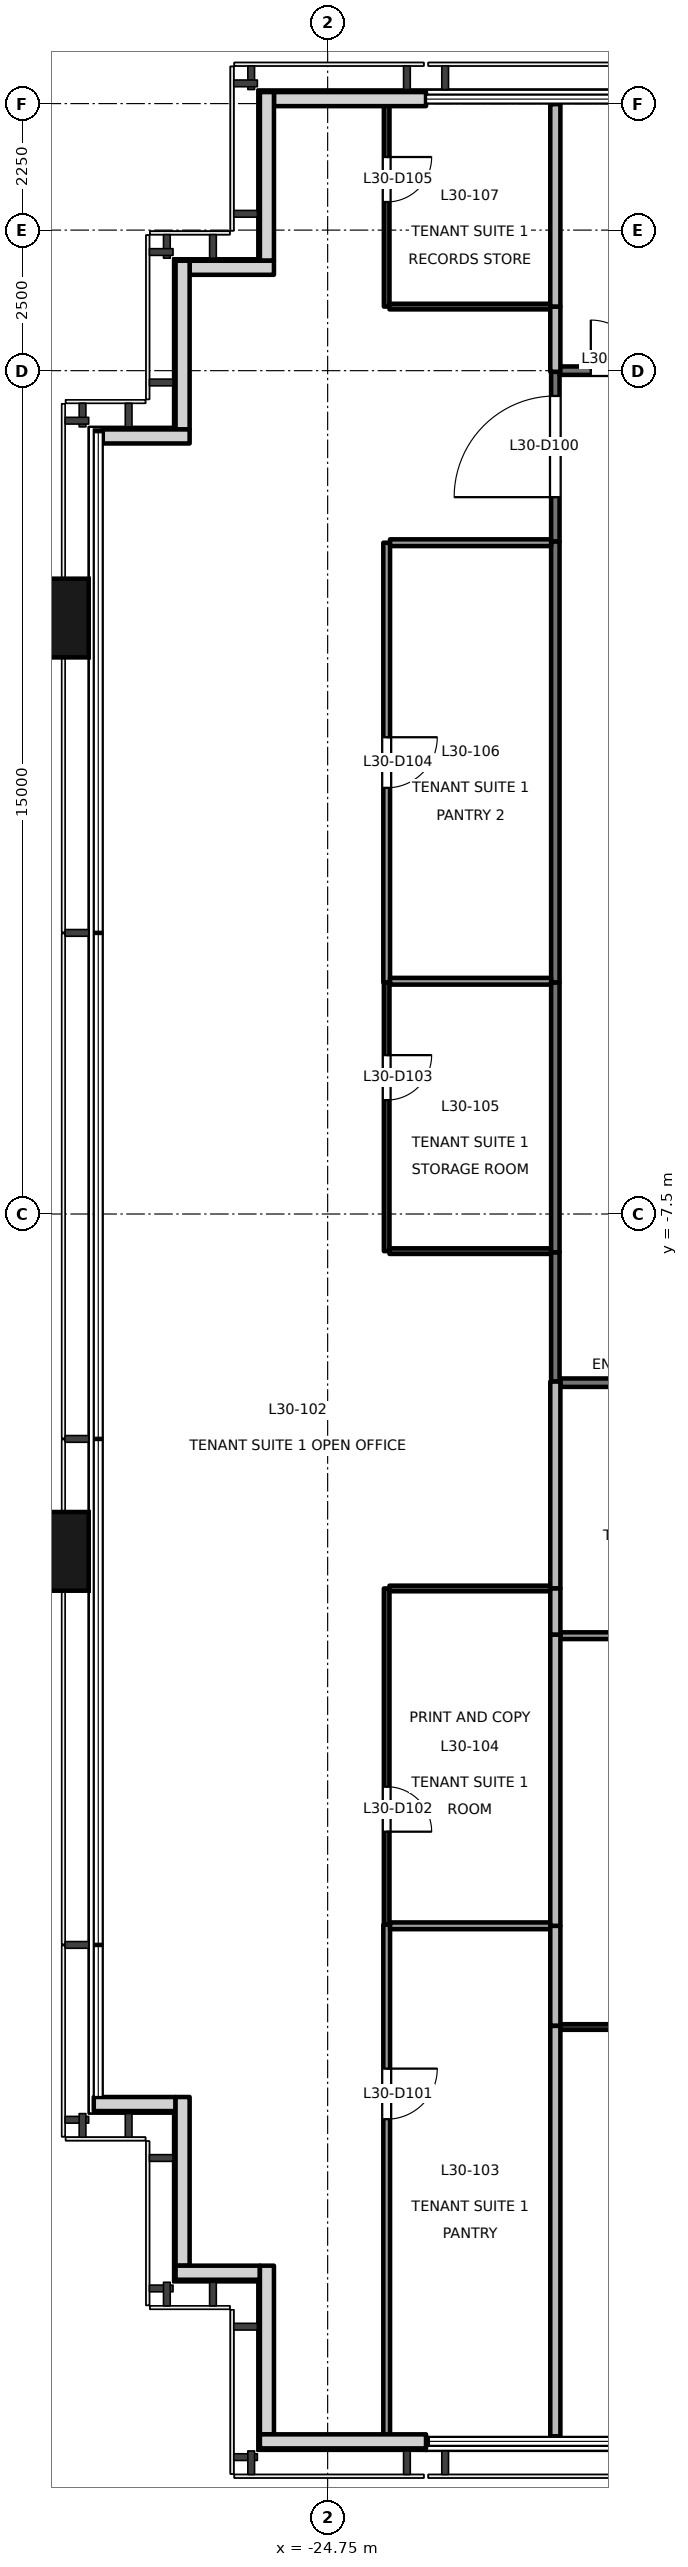
"""IFC4 building model, lengths in metres.
Left out: names, types, materials, properties, quantities, classifications, styles, units other than length and angle.
Written with IfcOpenShell. Run it as: python <this file> out.ifc"""

import sys

from ifc_helpers import new_model, si_unit, direction, frame, frame_2d, origin, origin_2d, place, context, subcontext, project, spatial, rectangle, extrude, element, fill, save


model = new_model("IFC4")
c1 = context("Model", 3, precision=1e-05, world=origin(), true_north=direction((0.0, 1.0)))
c2 = subcontext(c1, "Body", "Model", "MODEL_VIEW")
j1 = project(units=[si_unit("LENGTHUNIT", "METRE"), si_unit("PLANEANGLEUNIT", "RADIAN")], contexts=[c1])
p1 = place(None, origin())
s1 = spatial("IfcSite", under=j1, at=p1, CompositionType="ELEMENT")
p2 = place(p1, origin())
s2 = spatial("IfcBuilding", under=s1, at=p2, CompositionType="ELEMENT")
p3 = place(p2, frame((0.0, 0.0, 134.1)))
s3 = spatial("IfcBuildingStorey", under=s2, at=p3, CompositionType="ELEMENT", Elevation=134.1)
for number, where, z_axis, x_axis in (
    (1, (-29.9, -13.5, -0.2), (0.0, 0.0, 1.0), (0.0, 1.0, 0.0)),
    (2, (-29.9, 3.1, -0.2), (0.0, 0.0, 1.0), (0.0, 1.0, 0.0)),
):
    element("IfcColumn", number, at=place(p3, frame(where, z_axis=z_axis, x_axis=x_axis)), inside=s3, PredefinedType="COLUMN", context=c2, shape_type="SweptSolid", body=[
        extrude(rectangle(XDim=1.4, YDim=1.8, at=origin_2d()), origin(), (0.0, 0.0, 1.0), 4.0),
    ])
p4 = place(p3, frame((-23.0, 12.33, 0.0), z_axis=(0.0, 0.0, 1.0), x_axis=(-1.0, 0.0, 0.0)))
e3 = element("IfcWall", 3, at=p4, inside=s3, PredefinedType="SOLIDWALL", context=c2, shape_type="SweptSolid", body=[
    extrude(rectangle(XDim=2.705, YDim=0.25, at=frame_2d((1.353, 0.0))), origin(), (0.0, 0.0, 1.0), 3.8),
])
p5 = place(p3, frame((-25.83, 12.455, 0.0), z_axis=(0.0, 0.0, 1.0), x_axis=(0.0, -1.0, 0.0)))
e4 = element("IfcWall", 4, at=p5, inside=s3, PredefinedType="SOLIDWALL", context=c2, shape_type="SweptSolid", body=[
    extrude(rectangle(XDim=3.0, YDim=0.25, at=frame_2d((1.5, 0.0))), origin(), (0.0, 0.0, 1.0), 3.8),
])
p6 = place(p3, frame((-25.705, 9.33, 0.0), z_axis=(0.0, 0.0, 1.0), x_axis=(-1.0, 0.0, 0.0)))
e5 = element("IfcWall", 5, at=p6, inside=s3, PredefinedType="SOLIDWALL", context=c2, shape_type="SweptSolid", body=[
    extrude(rectangle(XDim=1.5, YDim=0.25, at=frame_2d((0.75, 0.0))), origin(), (0.0, 0.0, 1.0), 3.8),
])
p7 = place(p3, frame((-27.33, 9.455, 0.0), z_axis=(0.0, 0.0, 1.0), x_axis=(0.0, -1.0, 0.0)))
e6 = element("IfcWall", 6, at=p7, inside=s3, PredefinedType="SOLIDWALL", context=c2, shape_type="SweptSolid", body=[
    extrude(rectangle(XDim=3.0, YDim=0.25, at=frame_2d((1.5, 0.0))), origin(), (0.0, 0.0, 1.0), 3.8),
])
p8 = place(p3, frame((-27.205, 6.33, 0.0), z_axis=(0.0, 0.0, 1.0), x_axis=(-1.0, 0.0, 0.0)))
e7 = element("IfcWall", 7, at=p8, inside=s3, PredefinedType="SOLIDWALL", context=c2, shape_type="SweptSolid", body=[
    extrude(rectangle(XDim=1.545, YDim=0.25, at=frame_2d((0.772, 0.0))), origin(), (0.0, 0.0, 1.0), 3.8),
])
p9 = place(p3, frame((-28.91, -23.33, 0.0), z_axis=(0.0, 0.0, 1.0), x_axis=(1.0, 0.0, 0.0)))
e8 = element("IfcWall", 8, at=p9, inside=s3, PredefinedType="SOLIDWALL", context=c2, shape_type="SweptSolid", body=[
    extrude(rectangle(XDim=1.455, YDim=0.25, at=frame_2d((0.728, 0.0))), origin(), (0.0, 0.0, 1.0), 3.8),
])
p10 = place(p3, frame((-27.33, -23.205, 0.0), z_axis=(0.0, 0.0, 1.0), x_axis=(0.0, -1.0, 0.0)))
e9 = element("IfcWall", 9, at=p10, inside=s3, PredefinedType="SOLIDWALL", context=c2, shape_type="SweptSolid", body=[
    extrude(rectangle(XDim=3.0, YDim=0.25, at=frame_2d((1.5, 0.0))), origin(), (0.0, 0.0, 1.0), 3.8),
])
p11 = place(p3, frame((-27.455, -26.33, 0.0), z_axis=(0.0, 0.0, 1.0), x_axis=(1.0, 0.0, 0.0)))
e10 = element("IfcWall", 10, at=p11, inside=s3, PredefinedType="SOLIDWALL", context=c2, shape_type="SweptSolid", body=[
    extrude(rectangle(XDim=1.5, YDim=0.25, at=frame_2d((0.75, 0.0))), origin(), (0.0, 0.0, 1.0), 3.8),
])
p12 = place(p3, frame((-25.83, -26.205, 0.0), z_axis=(0.0, 0.0, 1.0), x_axis=(0.0, -1.0, 0.0)))
e11 = element("IfcWall", 11, at=p12, inside=s3, PredefinedType="SOLIDWALL", context=c2, shape_type="SweptSolid", body=[
    extrude(rectangle(XDim=3.0, YDim=0.25, at=frame_2d((1.5, 0.0))), origin(), (0.0, 0.0, 1.0), 3.8),
])
p13 = place(p3, frame((-25.955, -29.33, 0.0), z_axis=(0.0, 0.0, 1.0), x_axis=(1.0, 0.0, 0.0)))
e12 = element("IfcWall", 12, at=p13, inside=s3, PredefinedType="SOLIDWALL", context=c2, shape_type="SweptSolid", body=[
    extrude(rectangle(XDim=2.955, YDim=0.25, at=frame_2d((1.478, 0.0))), origin(), (0.0, 0.0, 1.0), 3.8),
])
p14 = place(p3, frame((-20.7, -10.48, 0.0), z_axis=(0.0, 0.0, 1.0), x_axis=(0.0, 1.0, 0.0)))
e13 = element("IfcWall", 13, at=p14, inside=s3, PredefinedType="PARTITIONING", context=c2, shape_type="SweptSolid", body=[
    extrude(rectangle(XDim=2.3, YDim=0.15, at=frame_2d((1.15, 0.0))), origin(), (0.0, 0.0, 1.0), 3.8),
])
p15 = place(p3, frame((-20.7, 4.46, 0.0), z_axis=(0.0, 0.0, 1.0), x_axis=(0.0, 1.0, 0.0)))
e14 = element("IfcWall", 14, at=p15, inside=s3, PredefinedType="PARTITIONING", context=c2, shape_type="SweptSolid", body=[
    extrude(rectangle(XDim=3.02, YDim=0.15, at=frame_2d((1.51, 0.0))), origin(), (0.0, 0.0, 1.0), 3.3),
])
p16 = place(p15, frame((0.79, 0.0, 0.0)))
e15 = element("IfcOpeningElement", 15, at=p16, cuts=e14, PredefinedType="OPENING", context=c2, shape_type="SweptSolid", body=[
    extrude(rectangle(XDim=1.8, YDim=2.1, at=frame_2d((0.9, 1.05))), frame((0.0, 0.085, 0.0), z_axis=(0.0, -1.0, 0.0), x_axis=(1.0, 0.0, 0.0)), (0.0, 0.0, 1.0), 0.171),
])
p17 = place(p3, frame((-20.7, -8.18, 0.0), z_axis=(0.0, 0.0, 1.0), x_axis=(0.0, 1.0, 0.0)))
e16 = element("IfcWall", 16, at=p17, inside=s3, PredefinedType="PARTITIONING", context=c2, shape_type="SweptSolid", body=[
    extrude(rectangle(XDim=4.8, YDim=0.15, at=frame_2d((2.4, 0.0))), origin(), (0.0, 0.0, 1.0), 3.3),
])
p18 = place(p3, frame((-20.7, -3.38, 0.0), z_axis=(0.0, 0.0, 1.0), x_axis=(0.0, 1.0, 0.0)))
e17 = element("IfcWall", 17, at=p18, inside=s3, PredefinedType="PARTITIONING", context=c2, shape_type="SweptSolid", body=[
    extrude(rectangle(XDim=7.84, YDim=0.15, at=frame_2d((3.92, 0.0))), origin(), (0.0, 0.0, 1.0), 3.3),
])
p19 = place(p3, frame((-15.92, -10.5, 0.0), z_axis=(0.0, 0.0, 1.0), x_axis=(-1.0, 0.0, 0.0)))
e18 = element("IfcWall", 18, at=p19, inside=s3, PredefinedType="PARTITIONING", context=c2, shape_type="SweptSolid", body=[
    extrude(rectangle(XDim=4.69, YDim=0.15, at=frame_2d((2.345, 0.0))), origin(), (0.0, 0.0, 1.0), 3.8),
])
p20 = place(p3, frame((-20.625, 7.5, 0.0), z_axis=(0.0, 0.0, 1.0), x_axis=(1.0, 0.0, 0.0)))
e19 = element("IfcWall", 19, at=p20, inside=s3, PredefinedType="PARTITIONING", context=c2, shape_type="SweptSolid", body=[
    extrude(rectangle(XDim=2.625, YDim=0.15, at=frame_2d((1.312, 0.0))), origin(), (0.0, 0.0, 1.0), 3.8),
])
p21 = place(p20, frame((0.556, 0.0, 0.0)))
e20 = element("IfcOpeningElement", 20, at=p21, cuts=e19, PredefinedType="OPENING", context=c2, shape_type="SweptSolid", body=[
    extrude(rectangle(XDim=0.9, YDim=2.1, at=frame_2d((0.45, 1.05))), frame((0.0, 0.085, 0.0), z_axis=(0.0, -1.0, 0.0), x_axis=(1.0, 0.0, 0.0)), (0.0, 0.0, 1.0), 0.171),
])
p22 = place(p3, frame((-23.7, -20.14, 0.0), z_axis=(0.0, 0.0, 1.0), x_axis=(0.0, -1.0, 0.0)))
e21 = element("IfcWall", 21, at=p22, inside=s3, PredefinedType="PARTITIONING", context=c2, shape_type="SweptSolid", body=[
    extrude(rectangle(XDim=9.1, YDim=0.12, at=frame_2d((4.55, 0.0))), origin(), (0.0, 0.0, 1.0), 3.8),
])
p23 = place(p22, frame((2.56, 0.0, 0.0)))
e22 = element("IfcOpeningElement", 22, at=p23, cuts=e21, PredefinedType="OPENING", context=c2, shape_type="SweptSolid", body=[
    extrude(rectangle(XDim=0.9, YDim=2.1, at=frame_2d((0.45, 1.05))), frame((0.0, 0.071, 0.0), z_axis=(0.0, -1.0, 0.0), x_axis=(1.0, 0.0, 0.0)), (0.0, 0.0, 1.0), 0.141),
])
p24 = place(p3, frame((-23.7, -14.16, 0.0), z_axis=(0.0, 0.0, 1.0), x_axis=(0.0, -1.0, 0.0)))
e23 = element("IfcWall", 23, at=p24, inside=s3, PredefinedType="PARTITIONING", context=c2, shape_type="SweptSolid", body=[
    extrude(rectangle(XDim=5.98, YDim=0.1, at=frame_2d((2.99, 0.0))), origin(), (0.0, 0.0, 1.0), 3.8),
])
p25 = place(p24, frame((3.526, 0.0, 0.0)))
e24 = element("IfcOpeningElement", 24, at=p25, cuts=e23, PredefinedType="OPENING", context=c2, shape_type="SweptSolid", body=[
    extrude(rectangle(XDim=0.8, YDim=2.1, at=frame_2d((0.4, 1.05))), frame((0.0, 0.061, 0.0), z_axis=(0.0, -1.0, 0.0), x_axis=(1.0, 0.0, 0.0)), (0.0, 0.0, 1.0), 0.121),
])
p26 = place(p3, frame((-20.79, -14.16, 0.0), z_axis=(0.0, 0.0, 1.0), x_axis=(-1.0, 0.0, 0.0)))
e25 = element("IfcWall", 25, at=p26, inside=s3, PredefinedType="PARTITIONING", context=c2, shape_type="SweptSolid", body=[
    extrude(rectangle(XDim=2.86, YDim=0.1, at=frame_2d((1.43, 0.0))), origin(), (0.0, 0.0, 1.0), 3.8),
])
p27 = place(p3, frame((-23.7, -3.38, 0.0), z_axis=(0.0, 0.0, 1.0), x_axis=(0.0, -1.0, 0.0)))
e26 = element("IfcWall", 26, at=p27, inside=s3, PredefinedType="PARTITIONING", context=c2, shape_type="SweptSolid", body=[
    extrude(rectangle(XDim=4.78, YDim=0.1, at=frame_2d((2.39, 0.0))), origin(), (0.0, 0.0, 1.0), 3.3),
])
p28 = place(p27, frame((1.294, 0.0, 0.0)))
e27 = element("IfcOpeningElement", 27, at=p28, cuts=e26, PredefinedType="OPENING", context=c2, shape_type="SweptSolid", body=[
    extrude(rectangle(XDim=0.8, YDim=2.1, at=frame_2d((0.4, 1.05))), frame((0.0, 0.061, 0.0), z_axis=(0.0, -1.0, 0.0), x_axis=(1.0, 0.0, 0.0)), (0.0, 0.0, 1.0), 0.121),
])
p29 = place(p3, frame((-23.65, -8.16, 0.0), z_axis=(0.0, 0.0, 1.0), x_axis=(1.0, 0.0, 0.0)))
e28 = element("IfcWall", 28, at=p29, inside=s3, PredefinedType="PARTITIONING", context=c2, shape_type="SweptSolid", body=[
    extrude(rectangle(XDim=2.875, YDim=0.1, at=frame_2d((1.438, 0.0))), origin(), (0.0, 0.0, 1.0), 3.8),
])
p30 = place(p3, frame((-23.7, 4.44, 0.0), z_axis=(0.0, 0.0, 1.0), x_axis=(0.0, -1.0, 0.0)))
e29 = element("IfcWall", 29, at=p30, inside=s3, PredefinedType="PARTITIONING", context=c2, shape_type="SweptSolid", body=[
    extrude(rectangle(XDim=7.82, YDim=0.12, at=frame_2d((3.91, 0.0))), origin(), (0.0, 0.0, 1.0), 3.3),
])
p31 = place(p30, frame((3.46, 0.0, 0.0)))
e30 = element("IfcOpeningElement", 30, at=p31, cuts=e29, PredefinedType="OPENING", context=c2, shape_type="SweptSolid", body=[
    extrude(rectangle(XDim=0.9, YDim=2.1, at=frame_2d((0.45, 1.05))), frame((0.0, 0.071, 0.0), z_axis=(0.0, -1.0, 0.0), x_axis=(1.0, 0.0, 0.0)), (0.0, 0.0, 1.0), 0.141),
])
p32 = place(p3, frame((-20.775, 4.44, 0.0), z_axis=(0.0, 0.0, 1.0), x_axis=(-1.0, 0.0, 0.0)))
e31 = element("IfcWall", 31, at=p32, inside=s3, PredefinedType="PARTITIONING", context=c2, shape_type="SweptSolid", body=[
    extrude(rectangle(XDim=2.865, YDim=0.12, at=frame_2d((1.433, 0.0))), origin(), (0.0, 0.0, 1.0), 3.3),
])
p33 = place(p3, frame((-23.7, 12.24, 0.0), z_axis=(0.0, 0.0, 1.0), x_axis=(0.0, -1.0, 0.0)))
e32 = element("IfcWall", 32, at=p33, inside=s3, PredefinedType="PARTITIONING", context=c2, shape_type="SweptSolid", body=[
    extrude(rectangle(XDim=3.6, YDim=0.1, at=frame_2d((1.8, 0.0))), origin(), (0.0, 0.0, 1.0), 3.8),
])
p34 = place(p33, frame((0.94, 0.0, 0.0)))
e33 = element("IfcOpeningElement", 33, at=p34, cuts=e32, PredefinedType="OPENING", context=c2, shape_type="SweptSolid", body=[
    extrude(rectangle(XDim=0.8, YDim=2.1, at=frame_2d((0.4, 1.05))), frame((0.0, 0.061, 0.0), z_axis=(0.0, -1.0, 0.0), x_axis=(1.0, 0.0, 0.0)), (0.0, 0.0, 1.0), 0.121),
])
p35 = place(p3, frame((-23.65, 8.64, 0.0), z_axis=(0.0, 0.0, 1.0), x_axis=(1.0, 0.0, 0.0)))
e34 = element("IfcWall", 34, at=p35, inside=s3, PredefinedType="PARTITIONING", context=c2, shape_type="SweptSolid", body=[
    extrude(rectangle(XDim=2.86, YDim=0.1, at=frame_2d((1.43, 0.0))), origin(), (0.0, 0.0, 1.0), 3.8),
])
p36 = place(p3, frame((-20.7, -10.48, 0.0), z_axis=(0.0, 0.0, 1.0), x_axis=(0.0, -1.0, 0.0)))
e35 = element("IfcWall", 35, at=p36, inside=s3, PredefinedType="PARTITIONING", context=c2, shape_type="SweptSolid", body=[
    extrude(rectangle(XDim=3.68, YDim=0.18, at=frame_2d((1.84, 0.0))), origin(), (0.0, 0.0, 1.0), 3.8),
])
p37 = place(p3, frame((-20.7, 8.64, 0.0), z_axis=(0.0, 0.0, 1.0), x_axis=(0.0, -1.0, 0.0)))
e36 = element("IfcWall", 36, at=p37, inside=s3, PredefinedType="PARTITIONING", context=c2, shape_type="SweptSolid", body=[
    extrude(rectangle(XDim=1.16, YDim=0.18, at=frame_2d((0.58, 0.0))), origin(), (0.0, 0.0, 1.0), 3.8),
])
p38 = place(p3, frame((-23.64, -20.16, 0.0), z_axis=(0.0, 0.0, 1.0), x_axis=(1.0, 0.0, 0.0)))
e37 = element("IfcWall", 37, at=p38, inside=s3, PredefinedType="PARTITIONING", context=c2, shape_type="SweptSolid", body=[
    extrude(rectangle(XDim=2.85, YDim=0.12, at=frame_2d((1.425, 0.0))), origin(), (0.0, 0.0, 1.0), 3.8),
])
p39 = place(p3, frame((-20.7, -20.16, 0.0), z_axis=(0.0, 0.0, 1.0), x_axis=(0.0, -1.0, 0.0)))
e38 = element("IfcWall", 38, at=p39, inside=s3, PredefinedType="PARTITIONING", context=c2, shape_type="SweptSolid", body=[
    extrude(rectangle(XDim=1.78, YDim=0.18, at=frame_2d((0.89, 0.0))), origin(), (0.0, 0.0, 1.0), 3.8),
])
p40 = place(p3, frame((-20.7, -21.94, 0.0), z_axis=(0.0, 0.0, 1.0), x_axis=(0.0, -1.0, 0.0)))
e39 = element("IfcWall", 39, at=p40, inside=s3, PredefinedType="PARTITIONING", context=c2, shape_type="SweptSolid", body=[
    extrude(rectangle(XDim=7.3, YDim=0.18, at=frame_2d((3.65, 0.0))), origin(), (0.0, 0.0, 1.0), 3.8),
])
p41 = place(p3, frame((-20.7, -14.98, 0.0), z_axis=(0.0, 0.0, 1.0), x_axis=(0.0, -1.0, 0.0)))
e40 = element("IfcWall", 40, at=p41, inside=s3, PredefinedType="PARTITIONING", context=c2, shape_type="SweptSolid", body=[
    extrude(rectangle(XDim=5.18, YDim=0.18, at=frame_2d((2.59, 0.0))), origin(), (0.0, 0.0, 1.0), 3.8),
])
p42 = place(p3, frame((-20.7, -14.16, 0.0), z_axis=(0.0, 0.0, 1.0), x_axis=(0.0, -1.0, 0.0)))
e41 = element("IfcWall", 41, at=p42, inside=s3, PredefinedType="PARTITIONING", context=c2, shape_type="SweptSolid", body=[
    extrude(rectangle(XDim=0.82, YDim=0.18, at=frame_2d((0.41, 0.0))), origin(), (0.0, 0.0, 1.0), 3.8),
])
p43 = place(p3, frame((-23.64, -3.36, 0.0), z_axis=(0.0, 0.0, 1.0), x_axis=(1.0, 0.0, 0.0)))
e42 = element("IfcWall", 42, at=p43, inside=s3, PredefinedType="PARTITIONING", context=c2, shape_type="SweptSolid", body=[
    extrude(rectangle(XDim=2.865, YDim=0.12, at=frame_2d((1.433, 0.0))), origin(), (0.0, 0.0, 1.0), 3.8),
])
p44 = place(p3, frame((-20.7, 12.24, 0.0), z_axis=(0.0, 0.0, 1.0), x_axis=(0.0, -1.0, 0.0)))
e43 = element("IfcWall", 43, at=p44, inside=s3, PredefinedType="PARTITIONING", context=c2, shape_type="SweptSolid", body=[
    extrude(rectangle(XDim=3.6, YDim=0.18, at=frame_2d((1.8, 0.0))), origin(), (0.0, 0.0, 1.0), 3.8),
])
p45 = place(p3, frame((-13.85, -21.96, 0.0), z_axis=(0.0, 0.0, 1.0), x_axis=(-1.0, 0.0, 0.0)))
e44 = element("IfcWall", 44, at=p45, inside=s3, PredefinedType="PARTITIONING", context=c2, shape_type="SweptSolid", body=[
    extrude(rectangle(XDim=6.76, YDim=0.1, at=frame_2d((3.38, 0.0))), origin(), (0.0, 0.0, 1.0), 3.8),
])
p46 = place(p45, frame((2.48, 0.0, 0.9)))
e45 = element("IfcOpeningElement", 45, at=p46, cuts=e44, PredefinedType="OPENING", context=c2, shape_type="SweptSolid", body=[
    extrude(rectangle(XDim=1.8, YDim=1.2, at=frame_2d((0.9, 0.6))), frame((0.0, 0.061, 0.0), z_axis=(0.0, -1.0, 0.0), x_axis=(1.0, 0.0, 0.0)), (0.0, 0.0, 1.0), 0.121),
])
p47 = place(p3, frame((-20.61, -15.0, 0.0), z_axis=(0.0, 0.0, 1.0), x_axis=(1.0, 0.0, 0.0)))
e46 = element("IfcWall", 46, at=p47, inside=s3, PredefinedType="PARTITIONING", context=c2, shape_type="SweptSolid", body=[
    extrude(rectangle(XDim=4.73, YDim=0.12, at=frame_2d((2.365, 0.0))), origin(), (0.0, 0.0, 1.0), 3.8),
])
p48 = place(p47, frame((1.249, 0.0, 0.0)))
e47 = element("IfcOpeningElement", 47, at=p48, cuts=e46, PredefinedType="OPENING", context=c2, shape_type="SweptSolid", body=[
    extrude(rectangle(XDim=0.9, YDim=2.1, at=frame_2d((0.45, 1.05))), frame((0.0, 0.071, 0.0), z_axis=(0.0, -1.0, 0.0), x_axis=(1.0, 0.0, 0.0)), (0.0, 0.0, 1.0), 0.141),
])
p49 = place(p16, origin())
e48 = element("IfcDoor", 48, at=p49, inside=s3, OperationType="DOUBLE_DOOR_SINGLE_SWING", PredefinedType="DOOR", context=c2, shape_type="SweptSolid", body=[
    extrude(rectangle(XDim=1.8, YDim=2.1, at=frame_2d((0.9, 1.05))), frame((0.0, 0.025, 0.0), z_axis=(0.0, -1.0, 0.0), x_axis=(1.0, 0.0, 0.0)), (0.0, 0.0, 1.0), 0.05),
])
fill(e15, e48)
p50 = place(p23, origin())
e49 = element("IfcDoor", 49, at=p50, inside=s3, OperationType="SINGLE_SWING_LEFT", PredefinedType="DOOR", context=c2, shape_type="SweptSolid", body=[
    extrude(rectangle(XDim=0.9, YDim=2.1, at=frame_2d((0.45, 1.05))), frame((0.0, 0.025, 0.0), z_axis=(0.0, -1.0, 0.0), x_axis=(1.0, 0.0, 0.0)), (0.0, 0.0, 1.0), 0.05),
])
fill(e22, e49)
p51 = place(p25, origin())
e50 = element("IfcDoor", 50, at=p51, inside=s3, OperationType="SINGLE_SWING_RIGHT", PredefinedType="DOOR", context=c2, shape_type="SweptSolid", body=[
    extrude(rectangle(XDim=0.8, YDim=2.1, at=frame_2d((0.4, 1.05))), frame((0.0, 0.025, 0.0), z_axis=(0.0, -1.0, 0.0), x_axis=(1.0, 0.0, 0.0)), (0.0, 0.0, 1.0), 0.05),
])
fill(e24, e50)
p52 = place(p28, origin())
e51 = element("IfcDoor", 51, at=p52, inside=s3, OperationType="SINGLE_SWING_LEFT", PredefinedType="DOOR", context=c2, shape_type="SweptSolid", body=[
    extrude(rectangle(XDim=0.8, YDim=2.1, at=frame_2d((0.4, 1.05))), frame((0.0, 0.025, 0.0), z_axis=(0.0, -1.0, 0.0), x_axis=(1.0, 0.0, 0.0)), (0.0, 0.0, 1.0), 0.05),
])
fill(e27, e51)
p53 = place(p31, origin())
e52 = element("IfcDoor", 52, at=p53, inside=s3, OperationType="SINGLE_SWING_LEFT", PredefinedType="DOOR", context=c2, shape_type="SweptSolid", body=[
    extrude(rectangle(XDim=0.9, YDim=2.1, at=frame_2d((0.45, 1.05))), frame((0.0, 0.025, 0.0), z_axis=(0.0, -1.0, 0.0), x_axis=(1.0, 0.0, 0.0)), (0.0, 0.0, 1.0), 0.05),
])
fill(e30, e52)
p54 = place(p34, origin())
e53 = element("IfcDoor", 53, at=p54, inside=s3, OperationType="SINGLE_SWING_LEFT", PredefinedType="DOOR", context=c2, shape_type="SweptSolid", body=[
    extrude(rectangle(XDim=0.8, YDim=2.1, at=frame_2d((0.4, 1.05))), frame((0.0, 0.025, 0.0), z_axis=(0.0, -1.0, 0.0), x_axis=(1.0, 0.0, 0.0)), (0.0, 0.0, 1.0), 0.05),
])
fill(e33, e53)
p55 = place(p21, origin())
e54 = element("IfcDoor", 54, at=p55, inside=s3, OperationType="SINGLE_SWING_LEFT", PredefinedType="DOOR", context=c2, shape_type="SweptSolid", body=[
    extrude(rectangle(XDim=0.9, YDim=2.1, at=frame_2d((0.45, 1.05))), frame((0.0, 0.025, 0.0), z_axis=(0.0, -1.0, 0.0), x_axis=(1.0, 0.0, 0.0)), (0.0, 0.0, 1.0), 0.05),
])
fill(e20, e54)
save(model, sys.argv[1])
